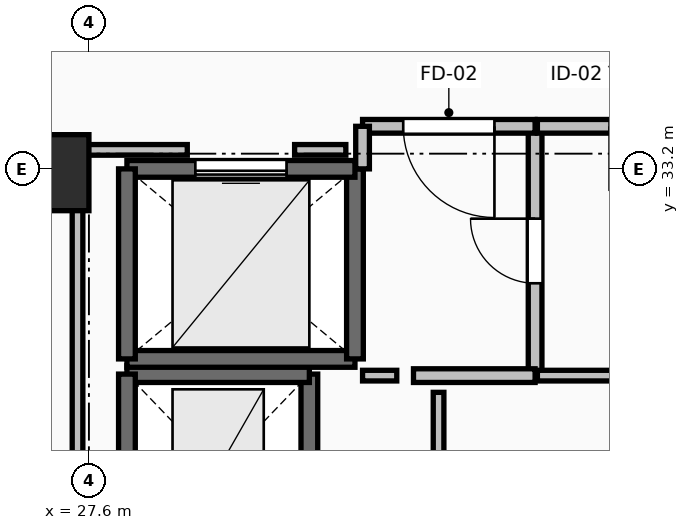
"""IFC4 building model, lengths in metres.
Left out: names, types, materials, properties, quantities, classifications, styles, units other than length and angle.
Written with IfcOpenShell. Run it as: python <this file> out.ifc"""

import sys

from ifc_helpers import new_model, si_unit, direction, frame, frame_2d, origin, origin_2d, place, context, subcontext, project, spatial, rectangle, extrude, element, fill, save


model = new_model("IFC4")
c1 = context("Model", 3, precision=1e-05, world=origin(), true_north=direction((0.0, 1.0)))
c2 = subcontext(c1, "Body", "Model", "MODEL_VIEW")
j1 = project(units=[si_unit("LENGTHUNIT", "METRE"), si_unit("PLANEANGLEUNIT", "RADIAN")], contexts=[c1])
p1 = place(None, origin())
s1 = spatial("IfcSite", under=j1, at=p1, CompositionType="ELEMENT")
p2 = place(p1, origin())
s2 = spatial("IfcBuilding", under=s1, at=p2, CompositionType="ELEMENT")
p3 = place(p2, frame((0.0, 0.0, 193.1)))
s3 = spatial("IfcBuildingStorey", under=s2, at=p3, CompositionType="ELEMENT", Elevation=193.1)
p4 = place(p3, frame((27.25, 33.15, 0.0), z_axis=(0.0, 0.0, 1.0), x_axis=(1.0, 0.0, 0.0)))
e1 = element("IfcColumn", 1, at=p4, inside=s3, PredefinedType="PILASTER", context=c2, shape_type="SweptSolid", body=[
    extrude(rectangle(XDim=0.7, YDim=1.0, at=origin_2d()), origin(), (0.0, 0.0, 1.0), 3.5),
])
p5 = place(p3, frame((30.5, 28.0, 0.0), z_axis=(0.0, 0.0, 1.0), x_axis=(0.0, 1.0, 0.0)))
e2 = element("IfcWall", 2, at=p5, inside=s3, PredefinedType="SHEAR", context=c2, shape_type="SweptSolid", body=[
    extrude(rectangle(XDim=2.5, YDim=0.22, at=frame_2d((1.25, 0.0))), origin(), (0.0, 0.0, 1.0), 3.24),
])
p6 = place(p3, frame((30.5, 30.5, 0.0), z_axis=(0.0, 0.0, 1.0), x_axis=(-1.0, 0.0, 0.0)))
e3 = element("IfcWall", 3, at=p6, inside=s3, PredefinedType="SHEAR", context=c2, shape_type="SweptSolid", body=[
    extrude(rectangle(XDim=2.4, YDim=0.22, at=frame_2d((1.2, 0.0))), origin(), (0.0, 0.0, 1.0), 3.24),
])
p7 = place(p3, frame((28.1, 30.5, 0.0), z_axis=(0.0, 0.0, 1.0), x_axis=(0.0, -1.0, 0.0)))
e4 = element("IfcWall", 4, at=p7, inside=s3, PredefinedType="SHEAR", context=c2, shape_type="SweptSolid", body=[
    extrude(rectangle(XDim=2.5, YDim=0.22, at=frame_2d((1.25, 0.0))), origin(), (0.0, 0.0, 1.0), 3.24),
])
p8 = place(p3, frame((28.1, 30.7, 0.0), z_axis=(0.0, 0.0, 1.0), x_axis=(1.0, 0.0, 0.0)))
e5 = element("IfcWall", 5, at=p8, inside=s3, PredefinedType="SOLIDWALL", context=c2, shape_type="SweptSolid", body=[
    extrude(rectangle(XDim=3.0, YDim=0.22, at=frame_2d((1.5, 0.0))), origin(), (0.0, 0.0, 1.0), 3.24),
])
p9 = place(p3, frame((31.1, 30.7, 0.0), z_axis=(0.0, 0.0, 1.0), x_axis=(0.0, 1.0, 0.0)))
e6 = element("IfcWall", 6, at=p9, inside=s3, PredefinedType="SOLIDWALL", context=c2, shape_type="SweptSolid", body=[
    extrude(rectangle(XDim=2.5, YDim=0.22, at=frame_2d((1.25, 0.0))), origin(), (0.0, 0.0, 1.0), 3.24),
])
p10 = place(p3, frame((31.1, 33.2, 0.0), z_axis=(0.0, 0.0, 1.0), x_axis=(-1.0, 0.0, 0.0)))
e7 = element("IfcWall", 7, at=p10, inside=s3, PredefinedType="SOLIDWALL", context=c2, shape_type="SweptSolid", body=[
    extrude(rectangle(XDim=3.0, YDim=0.22, at=frame_2d((1.5, 0.0))), origin(), (0.0, 0.0, 1.0), 3.24),
])
p11 = place(p10, frame((0.9, 0.0, 0.0)))
e8 = element("IfcOpeningElement", 8, at=p11, cuts=e7, PredefinedType="OPENING", context=c2, shape_type="SweptSolid", body=[
    extrude(rectangle(XDim=1.2, YDim=2.2, at=frame_2d((0.6, 1.1))), frame((0.0, 0.125, 0.0), z_axis=(0.0, -1.0, 0.0), x_axis=(1.0, 0.0, 0.0)), (0.0, 0.0, 1.0), 0.25),
])
p12 = place(p3, frame((28.1, 33.2, 0.0), z_axis=(0.0, 0.0, 1.0), x_axis=(0.0, -1.0, 0.0)))
e9 = element("IfcWall", 9, at=p12, inside=s3, PredefinedType="SOLIDWALL", context=c2, shape_type="SweptSolid", body=[
    extrude(rectangle(XDim=2.5, YDim=0.22, at=frame_2d((1.25, 0.0))), origin(), (0.0, 0.0, 1.0), 3.24),
])
p13 = place(p3, frame((33.47, 30.48, 0.0), z_axis=(0.0, 0.0, 1.0), x_axis=(0.0, 1.0, 0.0)))
e10 = element("IfcWall", 10, at=p13, inside=s3, PredefinedType="PARTITIONING", context=c2, shape_type="SweptSolid", body=[
    extrude(rectangle(XDim=3.28, YDim=0.18, at=frame_2d((1.64, 0.0))), origin(), (0.0, 0.0, 1.0), 3.24),
])
p14 = place(p13, frame((1.215, 0.0, 0.0)))
e11 = element("IfcOpeningElement", 11, at=p14, cuts=e10, PredefinedType="OPENING", context=c2, shape_type="SweptSolid", body=[
    extrude(rectangle(XDim=0.85, YDim=2.1, at=frame_2d((0.425, 1.05))), frame((0.0, 0.105, 0.0), z_axis=(0.0, -1.0, 0.0), x_axis=(1.0, 0.0, 0.0)), (0.0, 0.0, 1.0), 0.21),
])
p15 = place(p3, frame((31.87, 30.48, 0.0), z_axis=(0.0, 0.0, 1.0), x_axis=(1.0, 0.0, 0.0)))
e12 = element("IfcWall", 12, at=p15, inside=s3, PredefinedType="PARTITIONING", context=c2, shape_type="SweptSolid", body=[
    extrude(rectangle(XDim=1.6, YDim=0.18, at=frame_2d((0.8, 0.0))), origin(), (0.0, 0.0, 1.0), 3.24),
])
p16 = place(p3, frame((33.47, 33.76, 0.0), z_axis=(0.0, 0.0, 1.0), x_axis=(-1.0, 0.0, 0.0)))
e13 = element("IfcWall", 13, at=p16, inside=s3, PredefinedType="PARTITIONING", context=c2, shape_type="SweptSolid", body=[
    extrude(rectangle(XDim=2.27, YDim=0.18, at=frame_2d((1.135, 0.0))), origin(), (0.0, 0.0, 1.0), 3.24),
])
p17 = place(p16, frame((0.535, 0.0, 0.0)))
e14 = element("IfcOpeningElement", 14, at=p17, cuts=e13, PredefinedType="OPENING", context=c2, shape_type="SweptSolid", body=[
    extrude(rectangle(XDim=1.2, YDim=2.15, at=frame_2d((0.6, 1.075))), frame((0.0, 0.105, 0.0), z_axis=(0.0, -1.0, 0.0), x_axis=(1.0, 0.0, 0.0)), (0.0, 0.0, 1.0), 0.21),
])
p18 = place(p3, frame((31.2, 33.76, 0.0), z_axis=(0.0, 0.0, 1.0), x_axis=(0.0, -1.0, 0.0)))
e15 = element("IfcWall", 15, at=p18, inside=s3, PredefinedType="PARTITIONING", context=c2, shape_type="SweptSolid", body=[
    extrude(rectangle(XDim=0.56, YDim=0.18, at=frame_2d((0.28, 0.0))), origin(), (0.0, 0.0, 1.0), 3.24),
])
p19 = place(p3, frame((33.5, 30.48, 0.0), z_axis=(0.0, 0.0, 1.0), x_axis=(1.0, 0.0, 0.0)))
e16 = element("IfcWall", 16, at=p19, inside=s3, PredefinedType="PARTITIONING", context=c2, shape_type="SweptSolid", body=[
    extrude(rectangle(XDim=2.75, YDim=0.14, at=frame_2d((1.375, 0.0))), origin(), (0.0, 0.0, 1.0), 2.432),
])
p20 = place(p3, frame((36.25, 33.76, 0.0), z_axis=(0.0, 0.0, 1.0), x_axis=(-1.0, 0.0, 0.0)))
e17 = element("IfcWall", 17, at=p20, inside=s3, PredefinedType="PARTITIONING", context=c2, shape_type="SweptSolid", body=[
    extrude(rectangle(XDim=2.75, YDim=0.18, at=frame_2d((1.375, 0.0))), origin(), (0.0, 0.0, 1.0), 3.24),
])
p21 = place(p20, frame((0.95, 0.0, 0.0)))
e18 = element("IfcOpeningElement", 18, at=p21, cuts=e17, PredefinedType="OPENING", context=c2, shape_type="SweptSolid", body=[
    extrude(rectangle(XDim=0.85, YDim=2.1, at=frame_2d((0.425, 1.05))), frame((0.0, 0.105, 0.0), z_axis=(0.0, -1.0, 0.0), x_axis=(1.0, 0.0, 0.0)), (0.0, 0.0, 1.0), 0.21),
])
p22 = place(p3, frame((31.2, 30.48, 0.0), z_axis=(0.0, 0.0, 1.0), x_axis=(1.0, 0.0, 0.0)))
e19 = element("IfcWall", 19, at=p22, inside=s3, PredefinedType="PARTITIONING", context=c2, shape_type="SweptSolid", body=[
    extrude(rectangle(XDim=0.45, YDim=0.14, at=frame_2d((0.225, 0.0))), origin(), (0.0, 0.0, 1.0), 3.24),
])
p23 = place(p3, frame((32.2, 30.26, 0.0), z_axis=(0.0, 0.0, 1.0), x_axis=(0.0, -1.0, 0.0)))
e20 = element("IfcWall", 20, at=p23, inside=s3, PredefinedType="PARTITIONING", context=c2, shape_type="SweptSolid", body=[
    extrude(rectangle(XDim=2.39, YDim=0.14, at=frame_2d((1.195, 0.0))), origin(), (0.0, 0.0, 1.0), 3.24),
])
p24 = place(p3, frame((30.98, 33.45, 0.0), z_axis=(0.0, 0.0, 1.0), x_axis=(-1.0, 0.0, 0.0)))
e21 = element("IfcWall", 21, at=p24, inside=s3, PredefinedType="PARTITIONING", context=c2, shape_type="SweptSolid", body=[
    extrude(rectangle(XDim=0.674, YDim=0.14, at=frame_2d((0.337, 0.0))), origin(), (0.0, 0.0, 1.0), 3.24),
])
p25 = place(p3, frame((28.894, 33.45, 0.0), z_axis=(0.0, 0.0, 1.0), x_axis=(-1.0, 0.0, 0.0)))
e22 = element("IfcWall", 22, at=p25, inside=s3, PredefinedType="PARTITIONING", context=c2, shape_type="SweptSolid", body=[
    extrude(rectangle(XDim=1.444, YDim=0.14, at=frame_2d((0.722, 0.0))), origin(), (0.0, 0.0, 1.0), 2.432),
])
p26 = place(p3, frame((27.45, 33.45, 0.0), z_axis=(0.0, 0.0, 1.0), x_axis=(0.0, -1.0, 0.0)))
e23 = element("IfcWall", 23, at=p26, inside=s3, PredefinedType="PARTITIONING", context=c2, shape_type="SweptSolid", body=[
    extrude(rectangle(XDim=5.254, YDim=0.14, at=frame_2d((2.627, 0.0))), origin(), (0.0, 0.0, 1.0), 2.432),
])
p27 = place(p11, origin())
e24 = element("IfcDoor", 24, at=p27, inside=s3, OperationType="SLIDING_TO_LEFT", PredefinedType="DOOR", context=c2, shape_type="SweptSolid", body=[
    extrude(rectangle(XDim=1.2, YDim=2.2, at=frame_2d((0.6, 1.1))), frame((0.0, 0.025, 0.0), z_axis=(0.0, -1.0, 0.0), x_axis=(1.0, 0.0, 0.0)), (0.0, 0.0, 1.0), 0.05),
])
fill(e8, e24)
p28 = place(p14, origin())
e25 = element("IfcDoor", 25, at=p28, inside=s3, OperationType="SINGLE_SWING_RIGHT", PredefinedType="DOOR", context=c2, shape_type="SweptSolid", body=[
    extrude(rectangle(XDim=0.85, YDim=2.1, at=frame_2d((0.425, 1.05))), frame((0.0, 0.025, 0.0), z_axis=(0.0, -1.0, 0.0), x_axis=(1.0, 0.0, 0.0)), (0.0, 0.0, 1.0), 0.05),
])
fill(e11, e25)
p29 = place(p17, origin())
e26 = element("IfcDoor", 26, at=p29, inside=s3, OperationType="SINGLE_SWING_LEFT", PredefinedType="DOOR", context=c2, shape_type="SweptSolid", body=[
    extrude(rectangle(XDim=1.2, YDim=2.15, at=frame_2d((0.6, 1.075))), frame((0.0, 0.025, 0.0), z_axis=(0.0, -1.0, 0.0), x_axis=(1.0, 0.0, 0.0)), (0.0, 0.0, 1.0), 0.05),
])
fill(e14, e26)
save(model, sys.argv[1])
